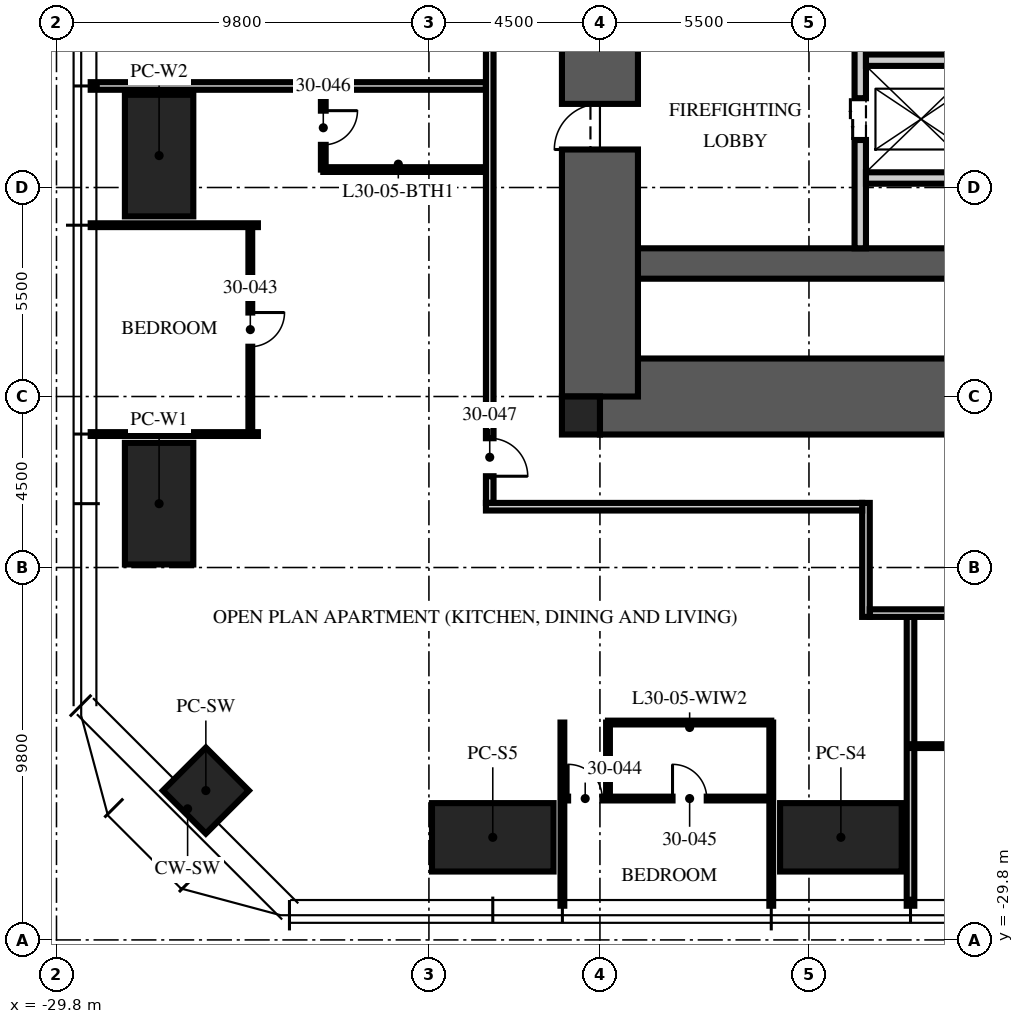
"""IFC4 building model, lengths in metres.
Left out: names, types, materials, properties, quantities, classifications, styles, units other than length and angle.
Written with IfcOpenShell. Run it as: python <this file> out.ifc"""

import sys

from ifc_helpers import new_model, si_unit, direction, frame, frame_2d, origin, origin_2d, place, context, subcontext, project, spatial, rectangle, extrude, element, fill, save


model = new_model("IFC4")
c1 = context("Model", 3, precision=1e-05, world=origin(), true_north=direction((0.0, 1.0)))
c2 = subcontext(c1, "Body", "Model", "MODEL_VIEW")
j1 = project(units=[si_unit("LENGTHUNIT", "METRE"), si_unit("PLANEANGLEUNIT", "RADIAN")], contexts=[c1])
p1 = place(None, origin())
s1 = spatial("IfcSite", under=j1, at=p1, CompositionType="ELEMENT")
p2 = place(p1, origin())
s2 = spatial("IfcBuilding", under=s1, at=p2, CompositionType="ELEMENT")
p3 = place(p2, frame((0.0, 0.0, 122.25)))
s3 = spatial("IfcBuildingStorey", under=s2, at=p3, CompositionType="ELEMENT", Elevation=122.25)
p4 = place(p3, frame((-15.5, -15.5, -0.25), z_axis=(0.0, 0.0, 1.0), x_axis=(1.0, 0.0, 0.0)))
e1 = element("IfcWall", 1, at=p4, inside=s3, PredefinedType="SHEAR", context=c2, shape_type="SweptSolid", body=[
    extrude(rectangle(XDim=31.0, YDim=2.0, at=frame_2d((15.5, 0.0))), origin(), (0.0, 0.0, 1.0), 3.75),
])
p5 = place(p4, frame((10.4, 0.0, 0.25)))
e2 = element("IfcOpeningElement", 2, at=p5, cuts=e1, PredefinedType="OPENING", context=c2, shape_type="SweptSolid", body=[
    extrude(rectangle(XDim=1.1, YDim=2.1, at=frame_2d((0.55, 1.05))), frame((0.0, 1.01, 0.0), z_axis=(0.0, -1.0, 0.0), x_axis=(1.0, 0.0, 0.0)), (0.0, 0.0, 1.0), 2.02),
])
p6 = place(p4, frame((13.5, 0.0, 0.25)))
e3 = element("IfcOpeningElement", 3, at=p6, cuts=e1, PredefinedType="OPENING", context=c2, shape_type="SweptSolid", body=[
    extrude(rectangle(XDim=1.1, YDim=2.1, at=frame_2d((0.55, 1.05))), frame((0.0, 1.01, 0.0), z_axis=(0.0, -1.0, 0.0), x_axis=(1.0, 0.0, 0.0)), (0.0, 0.0, 1.0), 2.02),
])
p7 = place(p4, frame((16.6, 0.0, 0.25)))
e4 = element("IfcOpeningElement", 4, at=p7, cuts=e1, PredefinedType="OPENING", context=c2, shape_type="SweptSolid", body=[
    extrude(rectangle(XDim=1.1, YDim=2.1, at=frame_2d((0.55, 1.05))), frame((0.0, 1.01, 0.0), z_axis=(0.0, -1.0, 0.0), x_axis=(1.0, 0.0, 0.0)), (0.0, 0.0, 1.0), 2.02),
])
p8 = place(p3, frame((-15.5, -12.0, -0.25), z_axis=(0.0, 0.0, 1.0), x_axis=(1.0, 0.0, 0.0)))
e5 = element("IfcWall", 5, at=p8, inside=s3, PredefinedType="SHEAR", context=c2, shape_type="SweptSolid", body=[
    extrude(rectangle(XDim=31.0, YDim=0.8, at=frame_2d((15.5, 0.0))), origin(), (0.0, 0.0, 1.0), 3.75),
])
p9 = place(p3, frame((-15.5, -15.5, -0.25), z_axis=(0.0, 0.0, 1.0), x_axis=(0.0, 1.0, 0.0)))
e6 = element("IfcWall", 6, at=p9, inside=s3, PredefinedType="SHEAR", context=c2, shape_type="SweptSolid", body=[
    extrude(rectangle(XDim=31.0, YDim=2.0, at=frame_2d((15.5, 0.0))), origin(), (0.0, 0.0, 1.0), 3.75),
])
p10 = place(p9, frame((6.5, 0.0, 0.25)))
e7 = element("IfcOpeningElement", 7, at=p10, cuts=e6, PredefinedType="OPENING", context=c2, shape_type="SweptSolid", body=[
    extrude(rectangle(XDim=1.2, YDim=2.1, at=frame_2d((0.6, 1.05))), frame((0.0, 1.01, 0.0), z_axis=(0.0, -1.0, 0.0), x_axis=(1.0, 0.0, 0.0)), (0.0, 0.0, 1.0), 2.02),
])
p11 = place(p9, frame((23.0, 0.0, 0.25)))
e8 = element("IfcOpeningElement", 8, at=p11, cuts=e6, PredefinedType="OPENING", context=c2, shape_type="SweptSolid", body=[
    extrude(rectangle(XDim=1.8, YDim=2.1, at=frame_2d((0.9, 1.05))), frame((0.0, 1.01, 0.0), z_axis=(0.0, -1.0, 0.0), x_axis=(1.0, 0.0, 0.0)), (0.0, 0.0, 1.0), 2.02),
])
p12 = place(p3, frame((-16.0, -16.0, -0.25), z_axis=(0.0, 0.0, 1.0), x_axis=(1.0, 0.0, 0.0)))
e9 = element("IfcColumn", 9, at=p12, inside=s3, PredefinedType="COLUMN", context=c2, shape_type="SweptSolid", body=[
    extrude(rectangle(XDim=1.0, YDim=1.0, at=origin_2d()), origin(), (0.0, 0.0, 1.0), 3.75),
])
for number, where, z_axis, x_axis in (
    (10, (-9.16, -27.1, 0.0), (0.0, 0.0, 1.0), (1.0, 0.0, 0.0)),
    (11, (-18.32, -27.1, 0.0), (0.0, 0.0, 1.0), (1.0, 0.0, 0.0)),
    (12, (-27.1, -18.32, 0.0), (0.0, 0.0, 1.0), (0.0, 1.0, 0.0)),
    (13, (-27.1, -9.16, 0.0), (0.0, 0.0, 1.0), (0.0, 1.0, 0.0)),
):
    element("IfcColumn", number, at=place(p3, frame(where, z_axis=z_axis, x_axis=x_axis)), inside=s3, PredefinedType="COLUMN", context=c2, shape_type="SweptSolid", body=[
        extrude(rectangle(XDim=3.2, YDim=1.8, at=origin_2d()), origin(), (0.0, 0.0, 1.0), 3.75),
    ])
p13 = place(p3, frame((-25.87, -25.87, 0.0), z_axis=(0.0, 0.0, 1.0), x_axis=(0.707106781187, -0.707106781187, 0.0)))
e14 = element("IfcColumn", 14, at=p13, inside=s3, PredefinedType="COLUMN", context=c2, shape_type="SweptSolid", body=[
    extrude(rectangle(XDim=1.6, YDim=1.6, at=origin_2d()), origin(), (0.0, 0.0, 1.0), 3.75),
])
p14 = place(p3, frame((-8.65, -11.6, 0.0), z_axis=(0.0, 0.0, 1.0), x_axis=(0.0, 1.0, 0.0)))
e15 = element("IfcWall", 15, at=p14, inside=s3, PredefinedType="PARTITIONING", context=c2, shape_type="SweptSolid", body=[
    extrude(rectangle(XDim=6.7, YDim=0.3, at=frame_2d((3.35, 0.0))), origin(), (0.0, 0.0, 1.0), 3.5),
])
p15 = place(p14, frame((2.85, 0.0, 0.0)))
e16 = element("IfcOpeningElement", 16, at=p15, cuts=e15, PredefinedType="OPENING", context=c2, shape_type="SweptSolid", body=[
    extrude(rectangle(XDim=1.1, YDim=2.1, at=frame_2d((0.55, 1.05))), frame((0.0, 0.16, 0.0), z_axis=(0.0, -1.0, 0.0), x_axis=(1.0, 0.0, 0.0)), (0.0, 0.0, 1.0), 0.32),
])
p16 = place(p3, frame((-8.5, -6.65, 0.0), z_axis=(0.0, 0.0, 1.0), x_axis=(1.0, 0.0, 0.0)))
e17 = element("IfcWall", 17, at=p16, inside=s3, PredefinedType="PARTITIONING", context=c2, shape_type="SweptSolid", body=[
    extrude(rectangle(XDim=17.0, YDim=0.3, at=frame_2d((8.5, 0.0))), origin(), (0.0, 0.0, 1.0), 3.5),
])
p17 = place(p16, frame((7.8, 0.0, 0.0)))
e18 = element("IfcOpeningElement", 18, at=p17, cuts=e17, PredefinedType="OPENING", context=c2, shape_type="SweptSolid", body=[
    extrude(rectangle(XDim=1.3, YDim=2.4, at=frame_2d((0.65, 1.2))), frame((0.0, 0.16, 0.0), z_axis=(0.0, -1.0, 0.0), x_axis=(1.0, 0.0, 0.0)), (0.0, 0.0, 1.0), 0.32),
])
p18 = place(p16, frame((5.65, 0.0, 0.0)))
e19 = element("IfcOpeningElement", 19, at=p18, cuts=e17, PredefinedType="OPENING", context=c2, shape_type="SweptSolid", body=[
    extrude(rectangle(XDim=0.9, YDim=2.1, at=frame_2d((0.45, 1.05))), frame((0.0, 0.16, 0.0), z_axis=(0.0, -1.0, 0.0), x_axis=(1.0, 0.0, 0.0)), (0.0, 0.0, 1.0), 0.32),
])
p19 = place(p16, frame((10.4, 0.0, 0.0)))
e20 = element("IfcOpeningElement", 20, at=p19, cuts=e17, PredefinedType="OPENING", context=c2, shape_type="SweptSolid", body=[
    extrude(rectangle(XDim=0.9, YDim=2.1, at=frame_2d((0.45, 1.05))), frame((0.0, 0.16, 0.0), z_axis=(0.0, -1.0, 0.0), x_axis=(1.0, 0.0, 0.0)), (0.0, 0.0, 1.0), 0.32),
])
p20 = place(p3, frame((-8.5, -9.75, 0.0), z_axis=(0.0, 0.0, 1.0), x_axis=(1.0, 0.0, 0.0)))
e21 = element("IfcWall", 21, at=p20, inside=s3, PredefinedType="PARTITIONING", context=c2, shape_type="SweptSolid", body=[
    extrude(rectangle(XDim=2.9, YDim=0.3, at=frame_2d((1.45, 0.0))), origin(), (0.0, 0.0, 1.0), 3.5),
])
p21 = place(p3, frame((-18.5, -7.328, 0.0), z_axis=(0.0, 0.0, 1.0), x_axis=(-1.0, 0.0, 0.0)))
e22 = element("IfcWall", 22, at=p21, inside=s3, PredefinedType="PARTITIONING", context=c2, shape_type="SweptSolid", body=[
    extrude(rectangle(XDim=10.4, YDim=0.2, at=frame_2d((5.2, 0.0))), origin(), (0.0, 0.0, 1.0), 2.81),
])
for number, where, z_axis, x_axis in (
    (23, (-24.5, -10.992, 0.0), (0.0, 0.0, 1.0), (-1.0, 0.0, 0.0)),
    (24, (-24.5, -16.488, 0.0), (0.0, 0.0, 1.0), (-1.0, 0.0, 0.0)),
):
    element("IfcWall", number, at=place(p3, frame(where, z_axis=z_axis, x_axis=x_axis)), inside=s3, PredefinedType="PARTITIONING", context=c2, shape_type="SweptSolid", body=[
        extrude(rectangle(XDim=4.4, YDim=0.1, at=frame_2d((2.2, 0.0))), origin(), (0.0, 0.0, 1.0), 2.81),
    ])
for number, where, z_axis, x_axis in (
    (25, (-16.488, -24.08, 0.0), (0.0, 0.0, 1.0), (0.0, -1.0, 0.0)),
    (26, (-10.992, -24.08, 0.0), (0.0, 0.0, 1.0), (0.0, -1.0, 0.0)),
):
    element("IfcWall", number, at=place(p3, frame(where, z_axis=z_axis, x_axis=x_axis)), inside=s3, PredefinedType="PARTITIONING", context=c2, shape_type="SweptSolid", body=[
        extrude(rectangle(XDim=4.82, YDim=0.1, at=frame_2d((2.41, 0.0))), origin(), (0.0, 0.0, 1.0), 2.81),
    ])
p22 = place(p3, frame((-7.328, -21.3, 0.0), z_axis=(0.0, 0.0, 1.0), x_axis=(0.0, -1.0, 0.0)))
e27 = element("IfcWall", 27, at=p22, inside=s3, PredefinedType="PARTITIONING", context=c2, shape_type="SweptSolid", body=[
    extrude(rectangle(XDim=7.6, YDim=0.2, at=frame_2d((3.8, 0.0))), origin(), (0.0, 0.0, 1.0), 2.81),
])
p23 = place(p3, frame((-24.7, -10.992, 0.0), z_axis=(0.0, 0.0, 1.0), x_axis=(0.0, -1.0, 0.0)))
e28 = element("IfcWall", 28, at=p23, inside=s3, PredefinedType="PARTITIONING", context=c2, shape_type="SweptSolid", body=[
    extrude(rectangle(XDim=5.496, YDim=0.1, at=frame_2d((2.748, 0.0))), origin(), (0.0, 0.0, 1.0), 2.81),
])
p24 = place(p23, frame((2.298, 0.0, 0.0)))
e29 = element("IfcOpeningElement", 29, at=p24, cuts=e28, PredefinedType="OPENING", context=c2, shape_type="SweptSolid", body=[
    extrude(rectangle(XDim=0.9, YDim=2.1, at=frame_2d((0.45, 1.05))), frame((0.0, 0.06, 0.0), z_axis=(0.0, -1.0, 0.0), x_axis=(1.0, 0.0, 0.0)), (0.0, 0.0, 1.0), 0.12),
])
p25 = place(p3, frame((-16.488, -26.08, 0.0), z_axis=(0.0, 0.0, 1.0), x_axis=(1.0, 0.0, 0.0)))
e30 = element("IfcWall", 30, at=p25, inside=s3, PredefinedType="PARTITIONING", context=c2, shape_type="SweptSolid", body=[
    extrude(rectangle(XDim=5.496, YDim=0.1, at=frame_2d((2.748, 0.0))), origin(), (0.0, 0.0, 1.0), 2.81),
])
p26 = place(p25, frame((0.15, 0.0, 0.0)))
e31 = element("IfcOpeningElement", 31, at=p26, cuts=e30, PredefinedType="OPENING", context=c2, shape_type="SweptSolid", body=[
    extrude(rectangle(XDim=0.9, YDim=2.1, at=frame_2d((0.45, 1.05))), frame((0.0, 0.06, 0.0), z_axis=(0.0, -1.0, 0.0), x_axis=(1.0, 0.0, 0.0)), (0.0, 0.0, 1.0), 0.12),
])
p27 = place(p25, frame((2.898, 0.0, 0.0)))
e32 = element("IfcOpeningElement", 32, at=p27, cuts=e30, PredefinedType="OPENING", context=c2, shape_type="SweptSolid", body=[
    extrude(rectangle(XDim=0.9, YDim=2.1, at=frame_2d((0.45, 1.05))), frame((0.0, 0.06, 0.0), z_axis=(0.0, -1.0, 0.0), x_axis=(1.0, 0.0, 0.0)), (0.0, 0.0, 1.0), 0.12),
])
p28 = place(p3, frame((-15.288, -24.08, 0.0), z_axis=(0.0, 0.0, 1.0), x_axis=(0.0, -1.0, 0.0)))
e33 = element("IfcWall", 33, at=p28, inside=s3, PredefinedType="PARTITIONING", context=c2, shape_type="SweptSolid", body=[
    extrude(rectangle(XDim=2.0, YDim=0.1, at=frame_2d((1.0, 0.0))), origin(), (0.0, 0.0, 1.0), 3.5),
])
p29 = place(p3, frame((-15.288, -24.08, 0.0), z_axis=(0.0, 0.0, 1.0), x_axis=(1.0, 0.0, 0.0)))
e34 = element("IfcWall", 34, at=p29, inside=s3, PredefinedType="PARTITIONING", context=c2, shape_type="SweptSolid", body=[
    extrude(rectangle(XDim=4.296, YDim=0.1, at=frame_2d((2.148, 0.0))), origin(), (0.0, 0.0, 1.0), 2.81),
])
p30 = place(p3, frame((-22.78, -7.328, 0.0), z_axis=(0.0, 0.0, 1.0), x_axis=(0.0, -1.0, 0.0)))
e35 = element("IfcWall", 35, at=p30, inside=s3, PredefinedType="PARTITIONING", context=c2, shape_type="SweptSolid", body=[
    extrude(rectangle(XDim=2.2, YDim=0.125, at=frame_2d((1.1, 0.0))), origin(), (0.0, 0.0, 1.0), 2.7),
])
p31 = place(p30, frame((0.65, 0.0, 0.0)))
e36 = element("IfcOpeningElement", 36, at=p31, cuts=e35, PredefinedType="OPENING", context=c2, shape_type="SweptSolid", body=[
    extrude(rectangle(XDim=0.9, YDim=2.1, at=frame_2d((0.45, 1.05))), frame((0.0, 0.073, 0.0), z_axis=(0.0, -1.0, 0.0), x_axis=(1.0, 0.0, 0.0)), (0.0, 0.0, 1.0), 0.145),
])
p32 = place(p3, frame((-18.5, -9.528, 0.0), z_axis=(0.0, 0.0, 1.0), x_axis=(-1.0, 0.0, 0.0)))
e37 = element("IfcWall", 37, at=p32, inside=s3, PredefinedType="PARTITIONING", context=c2, shape_type="SweptSolid", body=[
    extrude(rectangle(XDim=4.28, YDim=0.125, at=frame_2d((2.14, 0.0))), origin(), (0.0, 0.0, 1.0), 3.5),
])
p33 = place(p3, frame((-7.328, -24.7, 0.0), z_axis=(0.0, 0.0, 1.0), x_axis=(1.0, 0.0, 0.0)))
e38 = element("IfcWall", 38, at=p33, inside=s3, PredefinedType="PARTITIONING", context=c2, shape_type="SweptSolid", body=[
    extrude(rectangle(XDim=5.496, YDim=0.1, at=frame_2d((2.748, 0.0))), origin(), (0.0, 0.0, 1.0), 2.81),
])
p34 = place(p33, frame((2.298, 0.0, 0.0)))
e39 = element("IfcOpeningElement", 39, at=p34, cuts=e38, PredefinedType="OPENING", context=c2, shape_type="SweptSolid", body=[
    extrude(rectangle(XDim=0.9, YDim=2.1, at=frame_2d((0.45, 1.05))), frame((0.0, 0.06, 0.0), z_axis=(0.0, -1.0, 0.0), x_axis=(1.0, 0.0, 0.0)), (0.0, 0.0, 1.0), 0.12),
])
p35 = place(p3, frame((-18.4, 5.328, 0.0), z_axis=(0.0, 0.0, 1.0), x_axis=(0.0, -1.0, 0.0)))
e40 = element("IfcWall", 40, at=p35, inside=s3, PredefinedType="PARTITIONING", context=c2, shape_type="SweptSolid", body=[
    extrude(rectangle(XDim=23.628, YDim=0.2, at=frame_2d((11.814, 0.0))), origin(), (0.0, 0.0, 1.0), 2.3),
])
p36 = place(p35, frame((21.926, 0.0, 0.0)))
e41 = element("IfcOpeningElement", 41, at=p36, cuts=e40, PredefinedType="OPENING", context=c2, shape_type="SweptSolid", body=[
    extrude(rectangle(XDim=1.0, YDim=2.2, at=frame_2d((0.5, 1.1))), frame((0.0, 0.11, 0.0), z_axis=(0.0, -1.0, 0.0), x_axis=(1.0, 0.0, 0.0)), (0.0, 0.0, 1.0), 0.22),
])
p37 = place(p3, frame((-8.5, -18.3, 0.0), z_axis=(0.0, 0.0, 1.0), x_axis=(0.0, -1.0, 0.0)))
e42 = element("IfcWall", 42, at=p37, inside=s3, PredefinedType="PARTITIONING", context=c2, shape_type="SweptSolid", body=[
    extrude(rectangle(XDim=3.0, YDim=0.2, at=frame_2d((1.5, 0.0))), origin(), (0.0, 0.0, 1.0), 3.5),
])
p38 = place(p3, frame((5.4, -21.2, 0.0), z_axis=(0.0, 0.0, 1.0), x_axis=(-1.0, 0.0, 0.0)))
e43 = element("IfcWall", 43, at=p38, inside=s3, PredefinedType="PARTITIONING", context=c2, shape_type="SweptSolid", body=[
    extrude(rectangle(XDim=13.8, YDim=0.2, at=frame_2d((6.9, 0.0))), origin(), (0.0, 0.0, 1.0), 2.7),
])
p39 = place(p38, frame((0.958, 0.0, 0.0)))
e44 = element("IfcOpeningElement", 44, at=p39, cuts=e43, PredefinedType="OPENING", context=c2, shape_type="SweptSolid", body=[
    extrude(rectangle(XDim=1.0, YDim=2.2, at=frame_2d((0.5, 1.1))), frame((0.0, 0.11, 0.0), z_axis=(0.0, -1.0, 0.0), x_axis=(1.0, 0.0, 0.0)), (0.0, 0.0, 1.0), 0.22),
])
p40 = place(p3, frame((-8.6, -18.4, 0.0), z_axis=(0.0, 0.0, 1.0), x_axis=(-1.0, 0.0, 0.0)))
e45 = element("IfcWall", 45, at=p40, inside=s3, PredefinedType="PARTITIONING", context=c2, shape_type="SweptSolid", body=[
    extrude(rectangle(XDim=9.9, YDim=0.2, at=frame_2d((4.95, 0.0))), origin(), (0.0, 0.0, 1.0), 2.3),
])
p41 = place(p10, origin())
e46 = element("IfcDoor", 46, at=p41, inside=s3, OperationType="SINGLE_SWING_LEFT", PredefinedType="DOOR", context=c2, shape_type="SweptSolid", body=[
    extrude(rectangle(XDim=1.2, YDim=2.1, at=frame_2d((0.6, 1.05))), frame((0.0, 0.025, 0.0), z_axis=(0.0, -1.0, 0.0), x_axis=(1.0, 0.0, 0.0)), (0.0, 0.0, 1.0), 0.05),
])
fill(e7, e46)
p42 = place(p15, origin())
e47 = element("IfcDoor", 47, at=p42, inside=s3, OperationType="DOUBLE_DOOR_SLIDING", PredefinedType="DOOR", context=c2, shape_type="SweptSolid", body=[
    extrude(rectangle(XDim=1.1, YDim=2.1, at=frame_2d((0.55, 1.05))), frame((0.0, 0.025, 0.0), z_axis=(0.0, -1.0, 0.0), x_axis=(1.0, 0.0, 0.0)), (0.0, 0.0, 1.0), 0.05),
])
fill(e16, e47)
p43 = place(p24, origin())
e48 = element("IfcDoor", 48, at=p43, inside=s3, OperationType="SINGLE_SWING_LEFT", PredefinedType="DOOR", context=c2, shape_type="SweptSolid", body=[
    extrude(rectangle(XDim=0.9, YDim=2.1, at=frame_2d((0.45, 1.05))), frame((0.0, 0.025, 0.0), z_axis=(0.0, -1.0, 0.0), x_axis=(1.0, 0.0, 0.0)), (0.0, 0.0, 1.0), 0.05),
])
fill(e29, e48)
p44 = place(p26, origin())
e49 = element("IfcDoor", 49, at=p44, inside=s3, OperationType="SINGLE_SWING_LEFT", PredefinedType="DOOR", context=c2, shape_type="SweptSolid", body=[
    extrude(rectangle(XDim=0.9, YDim=2.1, at=frame_2d((0.45, 1.05))), frame((0.0, 0.025, 0.0), z_axis=(0.0, -1.0, 0.0), x_axis=(1.0, 0.0, 0.0)), (0.0, 0.0, 1.0), 0.05),
])
fill(e31, e49)
p45 = place(p27, origin())
e50 = element("IfcDoor", 50, at=p45, inside=s3, OperationType="SINGLE_SWING_LEFT", PredefinedType="DOOR", context=c2, shape_type="SweptSolid", body=[
    extrude(rectangle(XDim=0.9, YDim=2.1, at=frame_2d((0.45, 1.05))), frame((0.0, 0.025, 0.0), z_axis=(0.0, -1.0, 0.0), x_axis=(1.0, 0.0, 0.0)), (0.0, 0.0, 1.0), 0.05),
])
fill(e32, e50)
p46 = place(p31, origin())
e51 = element("IfcDoor", 51, at=p46, inside=s3, OperationType="SINGLE_SWING_LEFT", PredefinedType="DOOR", context=c2, shape_type="SweptSolid", body=[
    extrude(rectangle(XDim=0.9, YDim=2.1, at=frame_2d((0.45, 1.05))), frame((0.0, 0.025, 0.0), z_axis=(0.0, -1.0, 0.0), x_axis=(1.0, 0.0, 0.0)), (0.0, 0.0, 1.0), 0.05),
])
fill(e36, e51)
p47 = place(p36, origin())
e52 = element("IfcDoor", 52, at=p47, inside=s3, OperationType="SINGLE_SWING_RIGHT", PredefinedType="DOOR", context=c2, shape_type="SweptSolid", body=[
    extrude(rectangle(XDim=1.0, YDim=2.2, at=frame_2d((0.5, 1.1))), frame((0.0, 0.025, 0.0), z_axis=(0.0, -1.0, 0.0), x_axis=(1.0, 0.0, 0.0)), (0.0, 0.0, 1.0), 0.05),
])
fill(e41, e52)
save(model, sys.argv[1])
